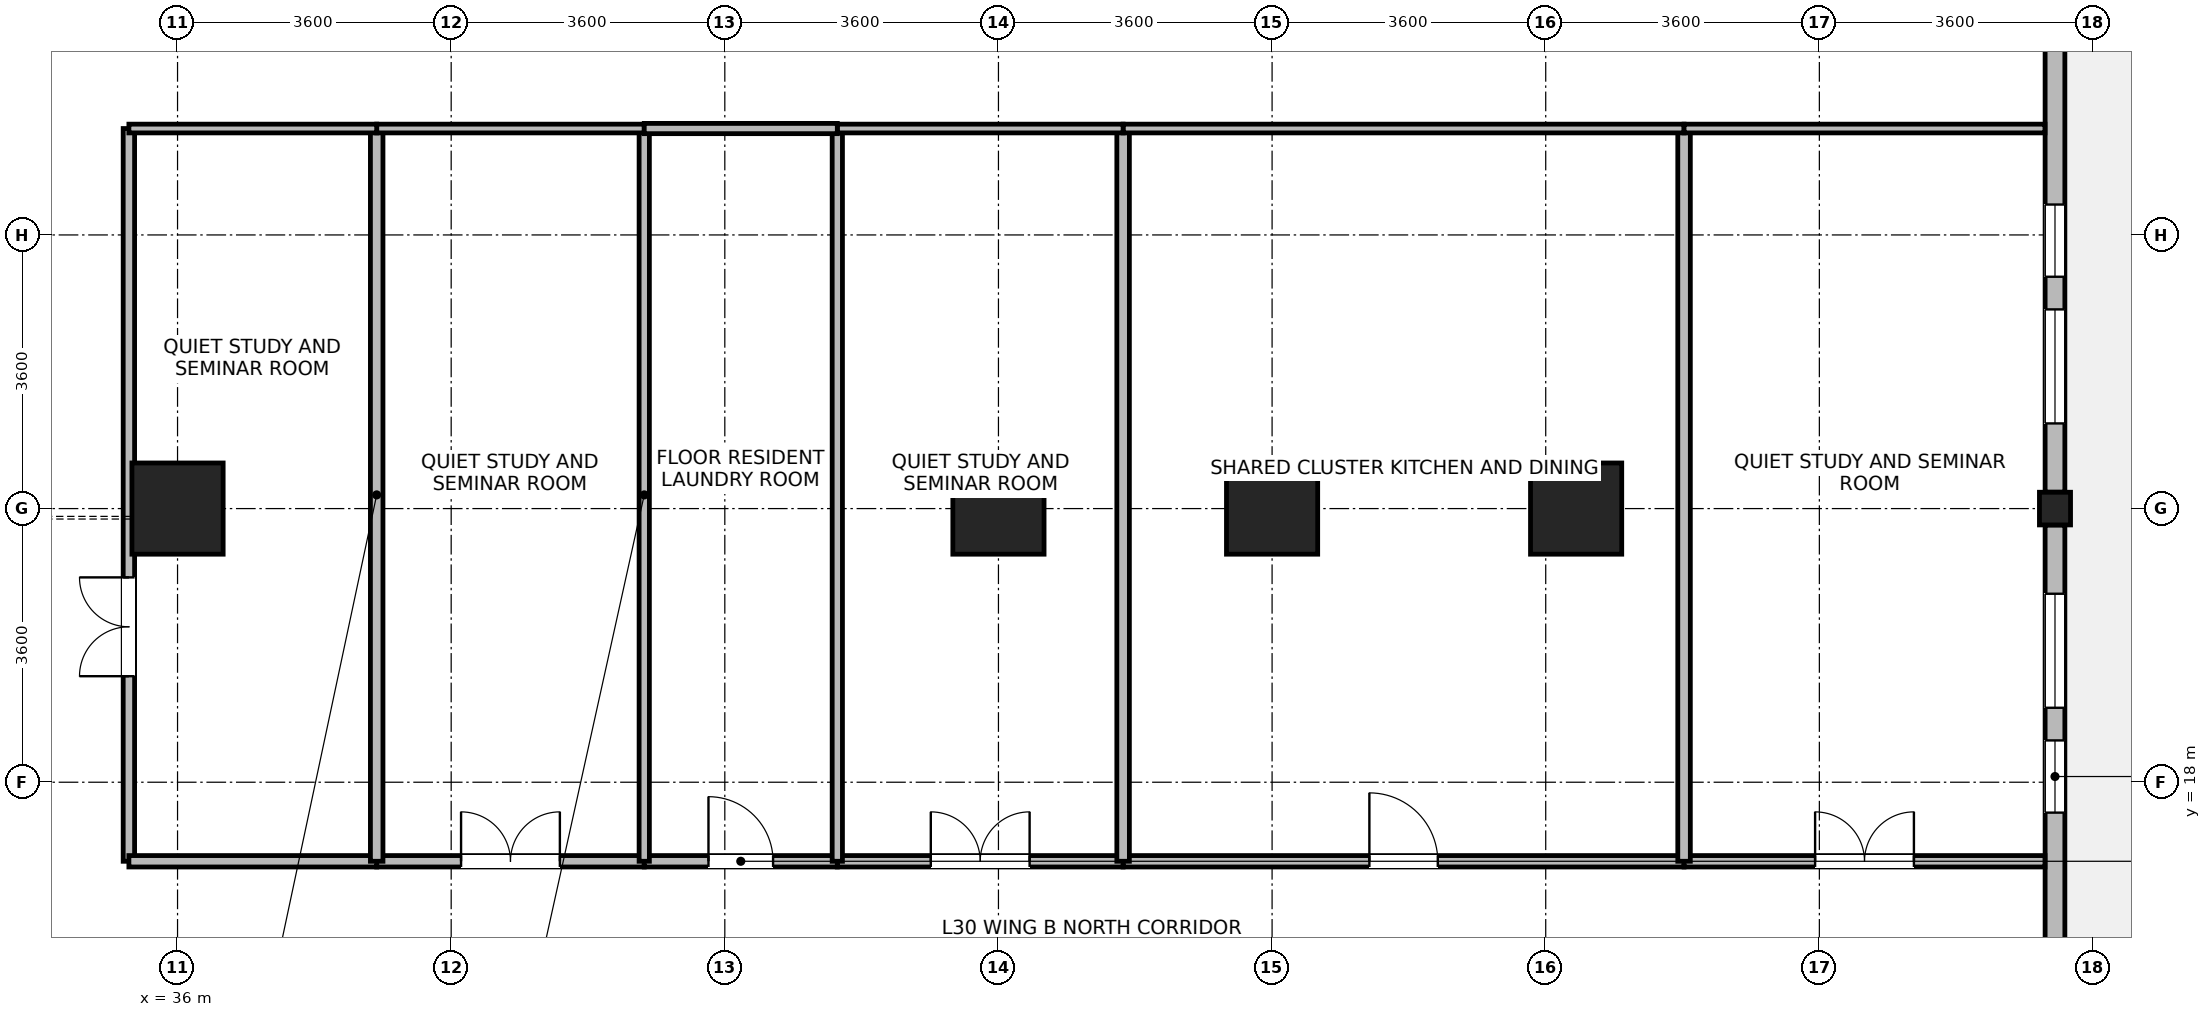
"""IFC4 building model, lengths in metres.
Left out: names, types, materials, properties, quantities, classifications, styles, units other than length and angle.
Written with IfcOpenShell. Run it as: python <this file> out.ifc"""

import sys

from ifc_helpers import new_model, si_unit, direction, frame, frame_2d, origin, origin_2d, place, context, subcontext, project, spatial, rectangle, i_section, extrude, source, transform, mapped, element, fill, save


model = new_model("IFC4")
c1 = context("Model", 3, precision=1e-05, world=origin(), true_north=direction((0.0, 1.0)))
c2 = subcontext(c1, "Body", "Model", "MODEL_VIEW")
j1 = project(units=[si_unit("LENGTHUNIT", "METRE"), si_unit("PLANEANGLEUNIT", "RADIAN")], contexts=[c1])
p1 = place(None, origin())
s1 = spatial("IfcSite", under=j1, at=p1, CompositionType="ELEMENT")
p2 = place(p1, origin())
s2 = spatial("IfcBuilding", under=s1, at=p2, CompositionType="ELEMENT")
p3 = place(p2, frame((0.0, 0.0, 119.3)))
s3 = spatial("IfcBuildingStorey", under=s2, at=p3, CompositionType="ELEMENT", Elevation=119.3)
m1 = source(origin(), c2, "Body", "SweptSolid", [
    extrude(rectangle(XDim=1.2, YDim=1.2, at=origin_2d()), origin(), (0.0, 0.0, 1.0), 3.7),
])
for number, where, z_axis, x_axis in (
    (1, (36.0, 21.6, 0.0), (0.0, 0.0, 1.0), (1.0, 0.0, 0.0)),
    (2, (46.8, 21.6, 0.0), (0.0, 0.0, 1.0), (1.0, 0.0, 0.0)),
    (3, (50.4, 21.6, 0.0), (0.0, 0.0, 1.0), (1.0, 0.0, 0.0)),
    (4, (54.4, 21.6, 0.0), (0.0, 0.0, 1.0), (1.0, 0.0, 0.0)),
):
    element("IfcColumn", number, at=place(p3, frame(where, z_axis=z_axis, x_axis=x_axis)), inside=s3, PredefinedType="COLUMN", context=c2, shape_type="MappedRepresentation", body=[
        mapped(m1, transform((0.0, 0.0, 0.0), x_axis=(1.0, 0.0, 0.0), y_axis=(0.0, 1.0, 0.0), z_axis=(0.0, 0.0, 1.0), scale=1.0)),
    ])
m2 = source(origin(), c2, "Body", "SweptSolid", [
    extrude(i_section(OverallWidth=0.409, OverallDepth=0.43, WebThickness=0.024, FlangeThickness=0.033, FilletRadius=0.015, at=origin_2d()), origin(), (0.0, 0.0, 1.0), 3.7),
])
p4 = place(p3, frame((60.7, 21.6, 0.0), z_axis=(0.0, 0.0, 1.0), x_axis=(1.0, 0.0, 0.0)))
e5 = element("IfcColumn", 5, at=p4, inside=s3, PredefinedType="COLUMN", context=c2, shape_type="MappedRepresentation", body=[
    mapped(m2, transform((0.0, 0.0, 0.0), x_axis=(1.0, 0.0, 0.0), y_axis=(0.0, 1.0, 0.0), z_axis=(0.0, 0.0, 1.0), scale=1.0)),
])
p5 = place(p3, frame((60.7, 21.384, 0.0), z_axis=(0.0, 0.0, 1.0), x_axis=(0.0, -1.0, 0.0)))
e6 = element("IfcWall", 6, at=p5, inside=s3, PredefinedType="STANDARD", context=c2, shape_type="SweptSolid", body=[
    extrude(rectangle(XDim=6.618, YDim=0.26, at=frame_2d((3.309, 0.0))), origin(), (0.0, 0.0, 1.0), 2.98),
])
p6 = place(p5, frame((0.905, 0.0, 0.85)))
e7 = element("IfcOpeningElement", 7, at=p6, cuts=e6, PredefinedType="OPENING", context=c2, shape_type="SweptSolid", body=[
    extrude(rectangle(XDim=1.5, YDim=1.85, at=frame_2d((0.75, 0.925))), frame((0.0, 0.14, 0.0), z_axis=(0.0, -1.0, 0.0), x_axis=(1.0, 0.0, 0.0)), (0.0, 0.0, 1.0), 0.28),
])
p7 = place(p5, frame((2.834, 0.0, 0.85)))
e8 = element("IfcOpeningElement", 8, at=p7, cuts=e6, PredefinedType="OPENING", context=c2, shape_type="SweptSolid", body=[
    extrude(rectangle(XDim=0.95, YDim=1.75, at=frame_2d((0.475, 0.875))), frame((0.0, 0.14, 0.0), z_axis=(0.0, -1.0, 0.0), x_axis=(1.0, 0.0, 0.0)), (0.0, 0.0, 1.0), 0.28),
])
p8 = place(p3, frame((60.7, 28.434, 0.0), z_axis=(0.0, 0.0, 1.0), x_axis=(0.0, -1.0, 0.0)))
e9 = element("IfcWall", 9, at=p8, inside=s3, PredefinedType="STANDARD", context=c2, shape_type="SweptSolid", body=[
    extrude(rectangle(XDim=6.618, YDim=0.26, at=frame_2d((3.309, 0.0))), origin(), (0.0, 0.0, 1.0), 2.98),
])
p9 = place(p8, frame((4.213, 0.0, 0.85)))
e10 = element("IfcOpeningElement", 10, at=p9, cuts=e9, PredefinedType="OPENING", context=c2, shape_type="SweptSolid", body=[
    extrude(rectangle(XDim=1.5, YDim=1.85, at=frame_2d((0.75, 0.925))), frame((0.0, 0.14, 0.0), z_axis=(0.0, -1.0, 0.0), x_axis=(1.0, 0.0, 0.0)), (0.0, 0.0, 1.0), 0.28),
])
p10 = place(p8, frame((2.834, 0.0, 0.85)))
e11 = element("IfcOpeningElement", 11, at=p10, cuts=e9, PredefinedType="OPENING", context=c2, shape_type="SweptSolid", body=[
    extrude(rectangle(XDim=0.95, YDim=1.75, at=frame_2d((0.475, 0.875))), frame((0.0, 0.14, 0.0), z_axis=(0.0, -1.0, 0.0), x_axis=(1.0, 0.0, 0.0)), (0.0, 0.0, 1.0), 0.28),
])
p11 = place(p3, frame((35.36, 16.96, 0.0), z_axis=(0.0, 0.0, 1.0), x_axis=(0.0, 1.0, 0.0)))
e12 = element("IfcWall", 12, at=p11, inside=s3, PredefinedType="PARTITIONING", context=c2, shape_type="SweptSolid", body=[
    extrude(rectangle(XDim=9.64, YDim=0.15, at=frame_2d((4.82, 0.0))), origin(), (0.0, 0.0, 1.0), 3.43),
])
p12 = place(p11, frame((2.435, 0.0, 0.0)))
e13 = element("IfcOpeningElement", 13, at=p12, cuts=e12, PredefinedType="OPENING", context=c2, shape_type="SweptSolid", body=[
    extrude(rectangle(XDim=1.3, YDim=2.12, at=frame_2d((0.65, 1.06))), frame((0.0, 0.085, 0.0), z_axis=(0.0, -1.0, 0.0), x_axis=(1.0, 0.0, 0.0)), (0.0, 0.0, 1.0), 0.17),
])
p13 = place(p3, frame((48.44, 16.96, 0.0), z_axis=(0.0, 0.0, 1.0), x_axis=(1.0, 0.0, 0.0)))
e14 = element("IfcWall", 14, at=p13, inside=s3, PredefinedType="PARTITIONING", context=c2, shape_type="SweptSolid", body=[
    extrude(rectangle(XDim=7.38, YDim=0.15, at=frame_2d((3.69, 0.0))), origin(), (0.0, 0.0, 1.0), 3.43),
])
p14 = place(p13, frame((3.24, 0.0, 0.0)))
e15 = element("IfcOpeningElement", 15, at=p14, cuts=e14, PredefinedType="OPENING", context=c2, shape_type="SweptSolid", body=[
    extrude(rectangle(XDim=0.9, YDim=2.08, at=frame_2d((0.45, 1.04))), frame((0.0, 0.085, 0.0), z_axis=(0.0, -1.0, 0.0), x_axis=(1.0, 0.0, 0.0)), (0.0, 0.0, 1.0), 0.17),
])
p15 = place(p3, frame((55.82, 16.96, 0.0), z_axis=(0.0, 0.0, 1.0), x_axis=(1.0, 0.0, 0.0)))
e16 = element("IfcWall", 16, at=p15, inside=s3, PredefinedType="PARTITIONING", context=c2, shape_type="SweptSolid", body=[
    extrude(rectangle(XDim=4.748, YDim=0.15, at=frame_2d((2.374, 0.0))), origin(), (0.0, 0.0, 1.0), 3.43),
])
p16 = place(p15, frame((1.724, 0.0, 0.0)))
e17 = element("IfcOpeningElement", 17, at=p16, cuts=e16, PredefinedType="OPENING", context=c2, shape_type="SweptSolid", body=[
    extrude(rectangle(XDim=1.3, YDim=2.12, at=frame_2d((0.65, 1.06))), frame((0.0, 0.085, 0.0), z_axis=(0.0, -1.0, 0.0), x_axis=(1.0, 0.0, 0.0)), (0.0, 0.0, 1.0), 0.17),
])
p17 = place(p3, frame((44.68, 16.96, 0.0), z_axis=(0.0, 0.0, 1.0), x_axis=(1.0, 0.0, 0.0)))
e18 = element("IfcWall", 18, at=p17, inside=s3, PredefinedType="PARTITIONING", context=c2, shape_type="SweptSolid", body=[
    extrude(rectangle(XDim=3.76, YDim=0.15, at=frame_2d((1.88, 0.0))), origin(), (0.0, 0.0, 1.0), 3.43),
])
p18 = place(p17, frame((1.23, 0.0, 0.0)))
e19 = element("IfcOpeningElement", 19, at=p18, cuts=e18, PredefinedType="OPENING", context=c2, shape_type="SweptSolid", body=[
    extrude(rectangle(XDim=1.3, YDim=2.12, at=frame_2d((0.65, 1.06))), frame((0.0, 0.085, 0.0), z_axis=(0.0, -1.0, 0.0), x_axis=(1.0, 0.0, 0.0)), (0.0, 0.0, 1.0), 0.17),
])
p19 = place(p3, frame((38.62, 16.96, 0.0), z_axis=(0.0, 0.0, 1.0), x_axis=(1.0, 0.0, 0.0)))
e20 = element("IfcWall", 20, at=p19, inside=s3, PredefinedType="PARTITIONING", context=c2, shape_type="SweptSolid", body=[
    extrude(rectangle(XDim=3.52, YDim=0.15, at=frame_2d((1.76, 0.0))), origin(), (0.0, 0.0, 1.0), 3.43),
])
p20 = place(p19, frame((1.11, 0.0, 0.0)))
e21 = element("IfcOpeningElement", 21, at=p20, cuts=e20, PredefinedType="OPENING", context=c2, shape_type="SweptSolid", body=[
    extrude(rectangle(XDim=1.3, YDim=2.12, at=frame_2d((0.65, 1.06))), frame((0.0, 0.085, 0.0), z_axis=(0.0, -1.0, 0.0), x_axis=(1.0, 0.0, 0.0)), (0.0, 0.0, 1.0), 0.17),
])
p21 = place(p3, frame((35.36, 16.96, 0.0), z_axis=(0.0, 0.0, 1.0), x_axis=(1.0, 0.0, 0.0)))
e22 = element("IfcWall", 22, at=p21, inside=s3, PredefinedType="PARTITIONING", context=c2, shape_type="SweptSolid", body=[
    extrude(rectangle(XDim=3.26, YDim=0.15, at=frame_2d((1.63, 0.0))), origin(), (0.0, 0.0, 1.0), 3.43),
])
p22 = place(p3, frame((42.14, 16.96, 0.0), z_axis=(0.0, 0.0, 1.0), x_axis=(1.0, 0.0, 0.0)))
e23 = element("IfcWall", 23, at=p22, inside=s3, PredefinedType="PARTITIONING", context=c2, shape_type="SweptSolid", body=[
    extrude(rectangle(XDim=2.54, YDim=0.15, at=frame_2d((1.27, 0.0))), origin(), (0.0, 0.0, 1.0), 3.43),
])
p23 = place(p22, frame((0.845, 0.0, 0.0)))
e24 = element("IfcOpeningElement", 24, at=p23, cuts=e23, PredefinedType="OPENING", context=c2, shape_type="SweptSolid", body=[
    extrude(rectangle(XDim=0.85, YDim=2.04, at=frame_2d((0.425, 1.02))), frame((0.0, 0.085, 0.0), z_axis=(0.0, -1.0, 0.0), x_axis=(1.0, 0.0, 0.0)), (0.0, 0.0, 1.0), 0.17),
])
p24 = place(p3, frame((38.62, 16.96, 0.0), z_axis=(0.0, 0.0, 1.0), x_axis=(0.0, 1.0, 0.0)))
e25 = element("IfcWall", 25, at=p24, inside=s3, PredefinedType="PARTITIONING", context=c2, shape_type="SweptSolid", body=[
    extrude(rectangle(XDim=9.64, YDim=0.165, at=frame_2d((4.82, 0.0))), origin(), (0.0, 0.0, 1.0), 3.43),
])
for number, where, z_axis, x_axis in (
    (26, (42.14, 16.96, 0.0), (0.0, 0.0, 1.0), (0.0, 1.0, 0.0)),
    (27, (44.68, 16.96, 0.0), (0.0, 0.0, 1.0), (0.0, 1.0, 0.0)),
):
    element("IfcWall", number, at=place(p3, frame(where, z_axis=z_axis, x_axis=x_axis)), inside=s3, PredefinedType="PARTITIONING", context=c2, shape_type="SweptSolid", body=[
        extrude(rectangle(XDim=9.64, YDim=0.135, at=frame_2d((4.82, 0.0))), origin(), (0.0, 0.0, 1.0), 3.43),
    ])
for number, where, z_axis, x_axis in (
    (28, (48.44, 16.96, 0.0), (0.0, 0.0, 1.0), (0.0, 1.0, 0.0)),
    (29, (55.82, 16.96, 0.0), (0.0, 0.0, 1.0), (0.0, 1.0, 0.0)),
):
    element("IfcWall", number, at=place(p3, frame(where, z_axis=z_axis, x_axis=x_axis)), inside=s3, PredefinedType="PARTITIONING", context=c2, shape_type="SweptSolid", body=[
        extrude(rectangle(XDim=9.64, YDim=0.165, at=frame_2d((4.82, 0.0))), origin(), (0.0, 0.0, 1.0), 3.43),
    ])
p25 = place(p3, frame((48.44, 26.6, 0.0), z_axis=(0.0, 0.0, 1.0), x_axis=(1.0, 0.0, 0.0)))
e30 = element("IfcWall", 30, at=p25, inside=s3, PredefinedType="PARTITIONING", context=c2, shape_type="SweptSolid", body=[
    extrude(rectangle(XDim=7.38, YDim=0.115, at=frame_2d((3.69, 0.0))), origin(), (0.0, 0.0, 1.0), 3.43),
])
p26 = place(p3, frame((55.82, 26.6, 0.0), z_axis=(0.0, 0.0, 1.0), x_axis=(1.0, 0.0, 0.0)))
e31 = element("IfcWall", 31, at=p26, inside=s3, PredefinedType="PARTITIONING", context=c2, shape_type="SweptSolid", body=[
    extrude(rectangle(XDim=4.748, YDim=0.115, at=frame_2d((2.374, 0.0))), origin(), (0.0, 0.0, 1.0), 3.43),
])
p27 = place(p3, frame((44.68, 26.6, 0.0), z_axis=(0.0, 0.0, 1.0), x_axis=(1.0, 0.0, 0.0)))
e32 = element("IfcWall", 32, at=p27, inside=s3, PredefinedType="PARTITIONING", context=c2, shape_type="SweptSolid", body=[
    extrude(rectangle(XDim=3.76, YDim=0.115, at=frame_2d((1.88, 0.0))), origin(), (0.0, 0.0, 1.0), 3.43),
])
p28 = place(p3, frame((38.62, 26.6, 0.0), z_axis=(0.0, 0.0, 1.0), x_axis=(1.0, 0.0, 0.0)))
e33 = element("IfcWall", 33, at=p28, inside=s3, PredefinedType="PARTITIONING", context=c2, shape_type="SweptSolid", body=[
    extrude(rectangle(XDim=3.52, YDim=0.115, at=frame_2d((1.76, 0.0))), origin(), (0.0, 0.0, 1.0), 3.43),
])
p29 = place(p3, frame((35.36, 26.6, 0.0), z_axis=(0.0, 0.0, 1.0), x_axis=(1.0, 0.0, 0.0)))
e34 = element("IfcWall", 34, at=p29, inside=s3, PredefinedType="PARTITIONING", context=c2, shape_type="SweptSolid", body=[
    extrude(rectangle(XDim=3.26, YDim=0.115, at=frame_2d((1.63, 0.0))), origin(), (0.0, 0.0, 1.0), 3.43),
])
p30 = place(p3, frame((42.14, 26.6, 0.0), z_axis=(0.0, 0.0, 1.0), x_axis=(1.0, 0.0, 0.0)))
e35 = element("IfcWall", 35, at=p30, inside=s3, PredefinedType="PARTITIONING", context=c2, shape_type="SweptSolid", body=[
    extrude(rectangle(XDim=2.54, YDim=0.135, at=frame_2d((1.27, 0.0))), origin(), (0.0, 0.0, 1.0), 3.43),
])
p31 = place(p6, origin())
e36 = element("IfcWindow", 36, at=p31, inside=s3, PartitioningType="SINGLE_PANEL", PredefinedType="WINDOW", context=c2, shape_type="SweptSolid", body=[
    extrude(rectangle(XDim=1.5, YDim=1.85, at=frame_2d((0.75, 0.925))), frame((0.0, 0.03, 0.0), z_axis=(0.0, -1.0, 0.0), x_axis=(1.0, 0.0, 0.0)), (0.0, 0.0, 1.0), 0.06),
])
fill(e7, e36)
p32 = place(p7, origin())
e37 = element("IfcWindow", 37, at=p32, inside=s3, PartitioningType="SINGLE_PANEL", PredefinedType="WINDOW", context=c2, shape_type="SweptSolid", body=[
    extrude(rectangle(XDim=0.95, YDim=1.75, at=frame_2d((0.475, 0.875))), frame((0.0, 0.03, 0.0), z_axis=(0.0, -1.0, 0.0), x_axis=(1.0, 0.0, 0.0)), (0.0, 0.0, 1.0), 0.06),
])
fill(e8, e37)
p33 = place(p9, origin())
e38 = element("IfcWindow", 38, at=p33, inside=s3, PartitioningType="SINGLE_PANEL", PredefinedType="WINDOW", context=c2, shape_type="SweptSolid", body=[
    extrude(rectangle(XDim=1.5, YDim=1.85, at=frame_2d((0.75, 0.925))), frame((0.0, 0.03, 0.0), z_axis=(0.0, -1.0, 0.0), x_axis=(1.0, 0.0, 0.0)), (0.0, 0.0, 1.0), 0.06),
])
fill(e10, e38)
p34 = place(p10, origin())
e39 = element("IfcWindow", 39, at=p34, inside=s3, PartitioningType="SINGLE_PANEL", PredefinedType="WINDOW", context=c2, shape_type="SweptSolid", body=[
    extrude(rectangle(XDim=0.95, YDim=1.75, at=frame_2d((0.475, 0.875))), frame((0.0, 0.03, 0.0), z_axis=(0.0, -1.0, 0.0), x_axis=(1.0, 0.0, 0.0)), (0.0, 0.0, 1.0), 0.06),
])
fill(e11, e39)
p35 = place(p12, origin())
e40 = element("IfcDoor", 40, at=p35, inside=s3, OperationType="DOUBLE_DOOR_SINGLE_SWING", PredefinedType="DOOR", context=c2, shape_type="SweptSolid", body=[
    extrude(rectangle(XDim=1.3, YDim=2.12, at=frame_2d((0.65, 1.06))), frame((0.0, 0.025, 0.0), z_axis=(0.0, -1.0, 0.0), x_axis=(1.0, 0.0, 0.0)), (0.0, 0.0, 1.0), 0.05),
])
fill(e13, e40)
p36 = place(p14, origin())
e41 = element("IfcDoor", 41, at=p36, inside=s3, OperationType="SINGLE_SWING_LEFT", PredefinedType="DOOR", context=c2, shape_type="SweptSolid", body=[
    extrude(rectangle(XDim=0.9, YDim=2.08, at=frame_2d((0.45, 1.04))), frame((0.0, 0.025, 0.0), z_axis=(0.0, -1.0, 0.0), x_axis=(1.0, 0.0, 0.0)), (0.0, 0.0, 1.0), 0.05),
])
fill(e15, e41)
p37 = place(p16, origin())
e42 = element("IfcDoor", 42, at=p37, inside=s3, OperationType="DOUBLE_DOOR_SINGLE_SWING", PredefinedType="DOOR", context=c2, shape_type="SweptSolid", body=[
    extrude(rectangle(XDim=1.3, YDim=2.12, at=frame_2d((0.65, 1.06))), frame((0.0, 0.025, 0.0), z_axis=(0.0, -1.0, 0.0), x_axis=(1.0, 0.0, 0.0)), (0.0, 0.0, 1.0), 0.05),
])
fill(e17, e42)
p38 = place(p18, origin())
e43 = element("IfcDoor", 43, at=p38, inside=s3, OperationType="DOUBLE_DOOR_SINGLE_SWING", PredefinedType="DOOR", context=c2, shape_type="SweptSolid", body=[
    extrude(rectangle(XDim=1.3, YDim=2.12, at=frame_2d((0.65, 1.06))), frame((0.0, 0.025, 0.0), z_axis=(0.0, -1.0, 0.0), x_axis=(1.0, 0.0, 0.0)), (0.0, 0.0, 1.0), 0.05),
])
fill(e19, e43)
p39 = place(p20, origin())
e44 = element("IfcDoor", 44, at=p39, inside=s3, OperationType="DOUBLE_DOOR_SINGLE_SWING", PredefinedType="DOOR", context=c2, shape_type="SweptSolid", body=[
    extrude(rectangle(XDim=1.3, YDim=2.12, at=frame_2d((0.65, 1.06))), frame((0.0, 0.025, 0.0), z_axis=(0.0, -1.0, 0.0), x_axis=(1.0, 0.0, 0.0)), (0.0, 0.0, 1.0), 0.05),
])
fill(e21, e44)
p40 = place(p23, origin())
e45 = element("IfcDoor", 45, at=p40, inside=s3, OperationType="SINGLE_SWING_LEFT", PredefinedType="DOOR", context=c2, shape_type="SweptSolid", body=[
    extrude(rectangle(XDim=0.85, YDim=2.04, at=frame_2d((0.425, 1.02))), frame((0.0, 0.025, 0.0), z_axis=(0.0, -1.0, 0.0), x_axis=(1.0, 0.0, 0.0)), (0.0, 0.0, 1.0), 0.05),
])
fill(e24, e45)
save(model, sys.argv[1])
